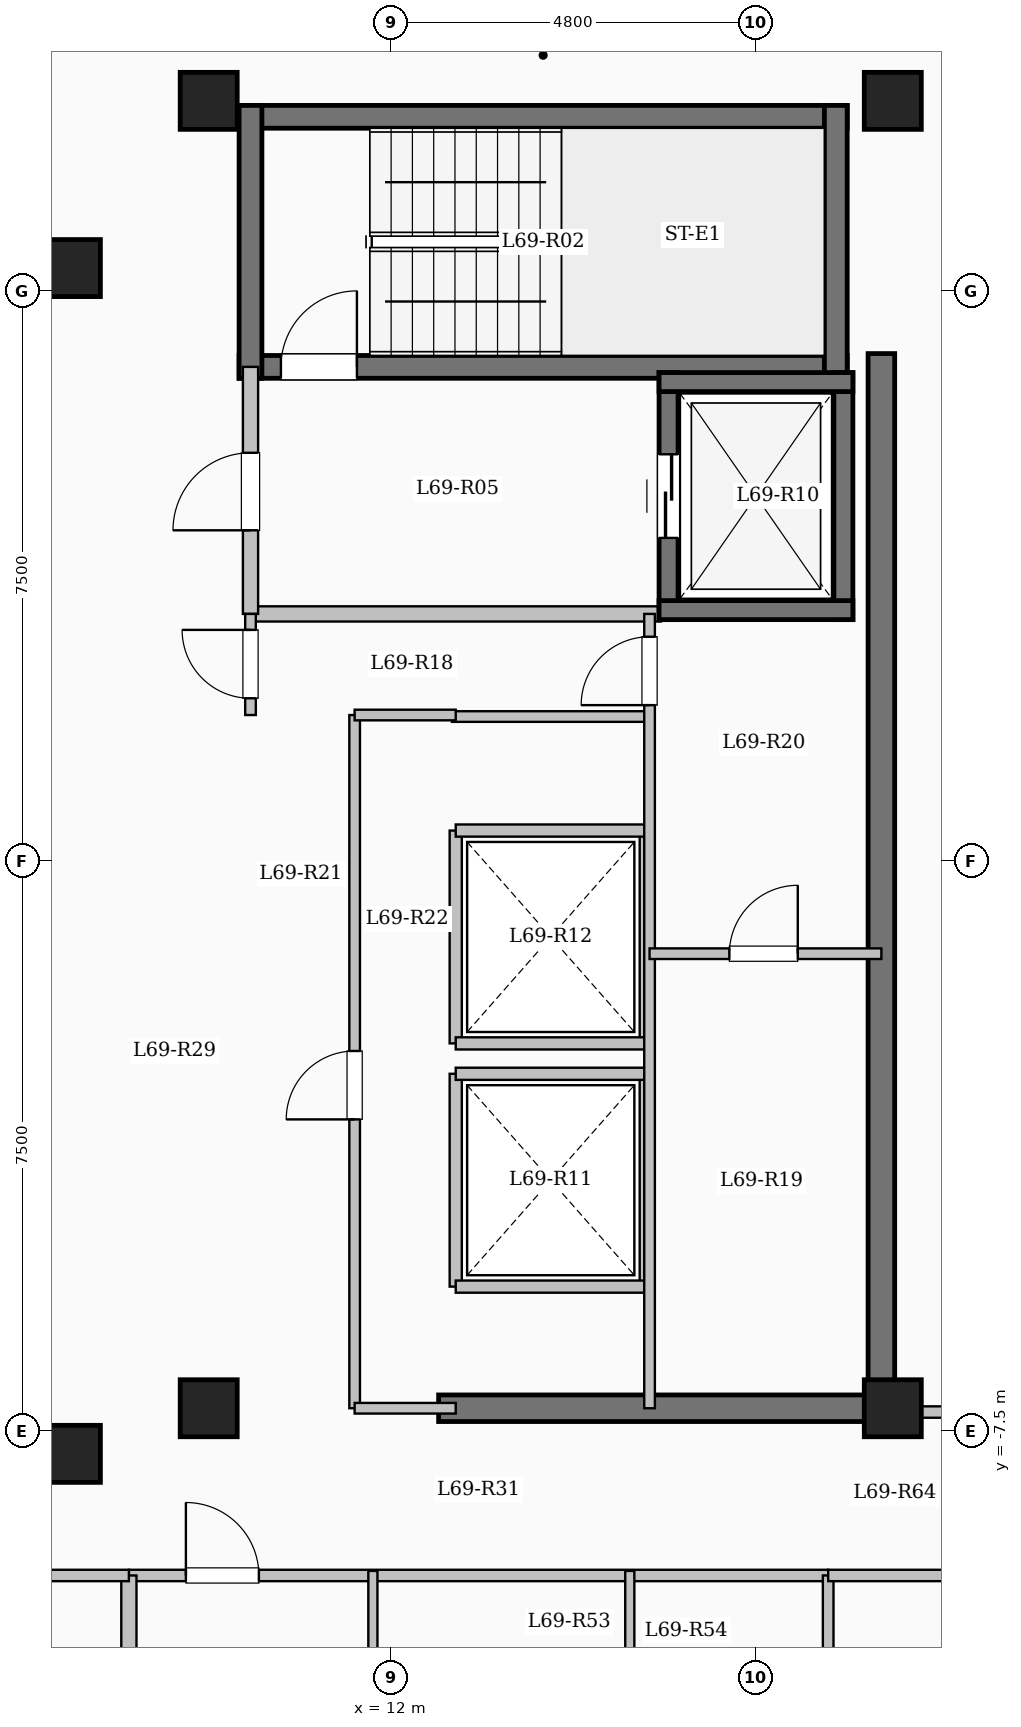
"""IFC4 building model, lengths in metres.
Left out: names, types, materials, properties, quantities, classifications, styles, units other than length and angle.
Written with IfcOpenShell. Run it as: python <this file> out.ifc"""

import sys

from ifc_helpers import new_model, si_unit, direction, frame, frame_2d, origin, origin_2d, place, context, subcontext, project, spatial, rectangle, extrude, element, fill, save


model = new_model("IFC4")
c1 = context("Model", 3, precision=1e-05, world=origin(), true_north=direction((0.0, 1.0)))
c2 = subcontext(c1, "Body", "Model", "MODEL_VIEW")
j1 = project(units=[si_unit("LENGTHUNIT", "METRE"), si_unit("PLANEANGLEUNIT", "RADIAN")], contexts=[c1])
p1 = place(None, origin())
s1 = spatial("IfcSite", under=j1, at=p1, CompositionType="ELEMENT")
p2 = place(p1, origin())
s2 = spatial("IfcBuilding", under=s1, at=p2, CompositionType="ELEMENT")
p3 = place(p2, frame((0.0, 0.0, 254.9)))
s3 = spatial("IfcBuildingStorey", under=s2, at=p3, CompositionType="ELEMENT", Elevation=254.9)
for number, where, z_axis, x_axis in (
    (1, (7.8, -7.8, 0.0), (0.0, 0.0, 1.0), (1.0, 0.0, 0.0)),
    (2, (7.8, 7.8, 0.0), (0.0, 0.0, 1.0), (1.0, 0.0, 0.0)),
    (3, (9.6, -7.2, 0.0), (0.0, 0.0, 1.0), (1.0, 0.0, 0.0)),
    (4, (9.6, 10.0, 0.0), (0.0, 0.0, 1.0), (1.0, 0.0, 0.0)),
    (5, (18.6, -7.2, 0.0), (0.0, 0.0, 1.0), (1.0, 0.0, 0.0)),
    (6, (18.6, 10.0, 0.0), (0.0, 0.0, 1.0), (1.0, 0.0, 0.0)),
):
    element("IfcColumn", number, at=place(p3, frame(where, z_axis=z_axis, x_axis=x_axis)), inside=s3, PredefinedType="COLUMN", context=c2, shape_type="SweptSolid", body=[
        extrude(rectangle(XDim=0.75, YDim=0.75, at=origin_2d()), origin(), (0.0, 0.0, 1.0), 3.35),
    ])
p4 = place(p3, frame((10.0, 9.79, 0.0), z_axis=(0.0, 0.0, 1.0), x_axis=(1.0, 0.0, 0.0)))
e7 = element("IfcWall", 7, at=p4, inside=s3, PredefinedType="SHEAR", context=c2, shape_type="SweptSolid", body=[
    extrude(rectangle(XDim=8.0, YDim=0.3, at=frame_2d((4.0, 0.0))), origin(), (0.0, 0.0, 1.0), 3.35),
])
p5 = place(p3, frame((10.0, 6.5, 0.0), z_axis=(0.0, 0.0, 1.0), x_axis=(1.0, 0.0, 0.0)))
e8 = element("IfcWall", 8, at=p5, inside=s3, PredefinedType="SHEAR", context=c2, shape_type="SweptSolid", body=[
    extrude(rectangle(XDim=8.0, YDim=0.3, at=frame_2d((4.0, 0.0))), origin(), (0.0, 0.0, 1.0), 3.35),
])
p6 = place(p5, frame((0.55, 0.0, 0.0)))
e9 = element("IfcOpeningElement", 9, at=p6, cuts=e8, PredefinedType="OPENING", context=c2, shape_type="SweptSolid", body=[
    extrude(rectangle(XDim=1.0, YDim=2.15, at=frame_2d((0.5, 1.075))), frame((0.0, 0.16, 0.0), z_axis=(0.0, -1.0, 0.0), x_axis=(1.0, 0.0, 0.0)), (0.0, 0.0, 1.0), 0.32),
])
for number, where, z_axis, x_axis in (
    (10, (10.15, 6.35, 0.0), (0.0, 0.0, 1.0), (0.0, 1.0, 0.0)),
    (11, (17.85, 6.35, 0.0), (0.0, 0.0, 1.0), (0.0, 1.0, 0.0)),
):
    element("IfcWall", number, at=place(p3, frame(where, z_axis=z_axis, x_axis=x_axis)), inside=s3, PredefinedType="SHEAR", context=c2, shape_type="SweptSolid", body=[
        extrude(rectangle(XDim=3.59, YDim=0.3, at=frame_2d((1.795, 0.0))), origin(), (0.0, 0.0, 1.0), 3.35),
    ])
p7 = place(p3, frame((10.15, 3.25, 0.0), z_axis=(0.0, 0.0, 1.0), x_axis=(1.0, 0.0, 0.0)))
e12 = element("IfcWall", 12, at=p7, inside=s3, PredefinedType="SOLIDWALL", context=c2, shape_type="SweptSolid", body=[
    extrude(rectangle(XDim=5.4, YDim=0.2, at=frame_2d((2.7, 0.0))), origin(), (0.0, 0.0, 1.0), 3.1),
])
p8 = place(p3, frame((10.15, 3.25, 0.0), z_axis=(0.0, 0.0, 1.0), x_axis=(0.0, 1.0, 0.0)))
e13 = element("IfcWall", 13, at=p8, inside=s3, PredefinedType="SOLIDWALL", context=c2, shape_type="SweptSolid", body=[
    extrude(rectangle(XDim=3.25, YDim=0.2, at=frame_2d((1.625, 0.0))), origin(), (0.0, 0.0, 1.0), 3.1),
])
p9 = place(p8, frame((1.1, 0.0, 0.0)))
e14 = element("IfcOpeningElement", 14, at=p9, cuts=e13, PredefinedType="OPENING", context=c2, shape_type="SweptSolid", body=[
    extrude(rectangle(XDim=1.02, YDim=2.15, at=frame_2d((0.51, 1.075))), frame((0.0, 0.11, 0.0), z_axis=(0.0, -1.0, 0.0), x_axis=(1.0, 0.0, 0.0)), (0.0, 0.0, 1.0), 0.22),
])
p10 = place(p3, frame((15.65, 3.175, 0.0), z_axis=(0.0, 0.0, 1.0), x_axis=(0.0, 1.0, 0.0)))
e15 = element("IfcWall", 15, at=p10, inside=s3, PredefinedType="SHEAR", context=c2, shape_type="SweptSolid", body=[
    extrude(rectangle(XDim=3.25, YDim=0.25, at=frame_2d((1.625, 0.0))), origin(), (0.0, 0.0, 1.0), 3.35),
])
p11 = place(p10, frame((1.075, 0.0, 0.0)))
e16 = element("IfcOpeningElement", 16, at=p11, cuts=e15, PredefinedType="OPENING", context=c2, shape_type="SweptSolid", body=[
    extrude(rectangle(XDim=1.1, YDim=2.15, at=frame_2d((0.55, 1.075))), frame((0.0, 0.135, 0.0), z_axis=(0.0, -1.0, 0.0), x_axis=(1.0, 0.0, 0.0)), (0.0, 0.0, 1.0), 0.27),
])
p12 = place(p3, frame((17.95, 3.175, 0.0), z_axis=(0.0, 0.0, 1.0), x_axis=(0.0, 1.0, 0.0)))
e17 = element("IfcWall", 17, at=p12, inside=s3, PredefinedType="SHEAR", context=c2, shape_type="SweptSolid", body=[
    extrude(rectangle(XDim=3.25, YDim=0.25, at=frame_2d((1.625, 0.0))), origin(), (0.0, 0.0, 1.0), 3.35),
])
for number, where, z_axis, x_axis in (
    (18, (15.525, 3.3, 0.0), (0.0, 0.0, 1.0), (1.0, 0.0, 0.0)),
    (19, (15.525, 6.3, 0.0), (0.0, 0.0, 1.0), (1.0, 0.0, 0.0)),
):
    element("IfcWall", number, at=place(p3, frame(where, z_axis=z_axis, x_axis=x_axis)), inside=s3, PredefinedType="SHEAR", context=c2, shape_type="SweptSolid", body=[
        extrude(rectangle(XDim=2.55, YDim=0.25, at=frame_2d((1.275, 0.0))), origin(), (0.0, 0.0, 1.0), 3.35),
    ])
for number, where, z_axis, x_axis in (
    (20, (12.85, -5.6, 0.0), (0.0, 0.0, 1.0), (0.0, 1.0, 0.0)),
    (21, (15.35, -5.6, 0.0), (0.0, 0.0, 1.0), (0.0, 1.0, 0.0)),
):
    element("IfcWall", number, at=place(p3, frame(where, z_axis=z_axis, x_axis=x_axis)), inside=s3, PredefinedType="SOLIDWALL", context=c2, shape_type="SweptSolid", body=[
        extrude(rectangle(XDim=2.8, YDim=0.16, at=frame_2d((1.4, 0.0))), origin(), (0.0, 0.0, 1.0), 3.1),
    ])
for number, where, z_axis, x_axis in (
    (22, (12.85, -5.6, 0.0), (0.0, 0.0, 1.0), (1.0, 0.0, 0.0)),
    (23, (12.85, -2.8, 0.0), (0.0, 0.0, 1.0), (1.0, 0.0, 0.0)),
):
    element("IfcWall", number, at=place(p3, frame(where, z_axis=z_axis, x_axis=x_axis)), inside=s3, PredefinedType="SOLIDWALL", context=c2, shape_type="SweptSolid", body=[
        extrude(rectangle(XDim=2.5, YDim=0.16, at=frame_2d((1.25, 0.0))), origin(), (0.0, 0.0, 1.0), 3.1),
    ])
for number, where, z_axis, x_axis in (
    (24, (12.85, -2.4, 0.0), (0.0, 0.0, 1.0), (0.0, 1.0, 0.0)),
    (25, (15.35, -2.4, 0.0), (0.0, 0.0, 1.0), (0.0, 1.0, 0.0)),
):
    element("IfcWall", number, at=place(p3, frame(where, z_axis=z_axis, x_axis=x_axis)), inside=s3, PredefinedType="SOLIDWALL", context=c2, shape_type="SweptSolid", body=[
        extrude(rectangle(XDim=2.8, YDim=0.16, at=frame_2d((1.4, 0.0))), origin(), (0.0, 0.0, 1.0), 3.1),
    ])
for number, where, z_axis, x_axis in (
    (26, (12.85, -2.4, 0.0), (0.0, 0.0, 1.0), (1.0, 0.0, 0.0)),
    (27, (12.85, 0.4, 0.0), (0.0, 0.0, 1.0), (1.0, 0.0, 0.0)),
):
    element("IfcWall", number, at=place(p3, frame(where, z_axis=z_axis, x_axis=x_axis)), inside=s3, PredefinedType="SOLIDWALL", context=c2, shape_type="SweptSolid", body=[
        extrude(rectangle(XDim=2.5, YDim=0.16, at=frame_2d((1.25, 0.0))), origin(), (0.0, 0.0, 1.0), 3.1),
    ])
p13 = place(p3, frame((18.45, -7.375, 0.0), z_axis=(0.0, 0.0, 1.0), x_axis=(0.0, 1.0, 0.0)))
e28 = element("IfcWall", 28, at=p13, inside=s3, PredefinedType="SHEAR", context=c2, shape_type="SweptSolid", body=[
    extrude(rectangle(XDim=14.05, YDim=0.35, at=frame_2d((7.025, 0.0))), origin(), (0.0, 0.0, 1.0), 3.35),
])
p14 = place(p3, frame((12.625, -7.2, 0.0), z_axis=(0.0, 0.0, 1.0), x_axis=(1.0, 0.0, 0.0)))
e29 = element("IfcWall", 29, at=p14, inside=s3, PredefinedType="SHEAR", context=c2, shape_type="SweptSolid", body=[
    extrude(rectangle(XDim=6.0, YDim=0.35, at=frame_2d((3.0, 0.0))), origin(), (0.0, 0.0, 1.0), 3.35),
])
p15 = place(p3, frame((12.8, 1.9, 0.0), z_axis=(0.0, 0.0, 1.0), x_axis=(1.0, 0.0, 0.0)))
e30 = element("IfcWall", 30, at=p15, inside=s3, PredefinedType="PARTITIONING", context=c2, shape_type="SweptSolid", body=[
    extrude(rectangle(XDim=2.6, YDim=0.14, at=frame_2d((1.3, 0.0))), origin(), (0.0, 0.0, 1.0), 3.1),
])
p16 = place(p3, frame((10.15, 1.92, 0.0), z_axis=(0.0, 0.0, 1.0), x_axis=(0.0, 1.0, 0.0)))
e31 = element("IfcWall", 31, at=p16, inside=s3, PredefinedType="PARTITIONING", context=c2, shape_type="SweptSolid", body=[
    extrude(rectangle(XDim=1.33, YDim=0.14, at=frame_2d((0.665, 0.0))), origin(), (0.0, 0.0, 1.0), 3.1),
])
p17 = place(p16, frame((0.22, 0.0, 0.0)))
e32 = element("IfcOpeningElement", 32, at=p17, cuts=e31, PredefinedType="OPENING", context=c2, shape_type="SweptSolid", body=[
    extrude(rectangle(XDim=0.9, YDim=2.08, at=frame_2d((0.45, 1.04))), frame((0.0, 0.08, 0.0), z_axis=(0.0, -1.0, 0.0), x_axis=(1.0, 0.0, 0.0)), (0.0, 0.0, 1.0), 0.16),
])
p18 = place(p3, frame((15.4, -7.2, 0.0), z_axis=(0.0, 0.0, 1.0), x_axis=(0.0, 1.0, 0.0)))
e33 = element("IfcWall", 33, at=p18, inside=s3, PredefinedType="PARTITIONING", context=c2, shape_type="SweptSolid", body=[
    extrude(rectangle(XDim=10.45, YDim=0.14, at=frame_2d((5.225, 0.0))), origin(), (0.0, 0.0, 1.0), 3.1),
])
p19 = place(p18, frame((9.25, 0.0, 0.0)))
e34 = element("IfcOpeningElement", 34, at=p19, cuts=e33, PredefinedType="OPENING", context=c2, shape_type="SweptSolid", body=[
    extrude(rectangle(XDim=0.9, YDim=2.08, at=frame_2d((0.45, 1.04))), frame((0.0, 0.08, 0.0), z_axis=(0.0, -1.0, 0.0), x_axis=(1.0, 0.0, 0.0)), (0.0, 0.0, 1.0), 0.16),
])
p20 = place(p3, frame((15.4, -1.22, 0.0), z_axis=(0.0, 0.0, 1.0), x_axis=(1.0, 0.0, 0.0)))
e35 = element("IfcWall", 35, at=p20, inside=s3, PredefinedType="PARTITIONING", context=c2, shape_type="SweptSolid", body=[
    extrude(rectangle(XDim=3.05, YDim=0.14, at=frame_2d((1.525, 0.0))), origin(), (0.0, 0.0, 1.0), 3.1),
])
p21 = place(p20, frame((1.05, 0.0, 0.0)))
e36 = element("IfcOpeningElement", 36, at=p21, cuts=e35, PredefinedType="OPENING", context=c2, shape_type="SweptSolid", body=[
    extrude(rectangle(XDim=0.9, YDim=2.08, at=frame_2d((0.45, 1.04))), frame((0.0, 0.08, 0.0), z_axis=(0.0, -1.0, 0.0), x_axis=(1.0, 0.0, 0.0)), (0.0, 0.0, 1.0), 0.16),
])
p22 = place(p3, frame((11.52, -7.2, 0.0), z_axis=(0.0, 0.0, 1.0), x_axis=(0.0, 1.0, 0.0)))
e37 = element("IfcWall", 37, at=p22, inside=s3, PredefinedType="PARTITIONING", context=c2, shape_type="SweptSolid", body=[
    extrude(rectangle(XDim=9.12, YDim=0.14, at=frame_2d((4.56, 0.0))), origin(), (0.0, 0.0, 1.0), 3.1),
])
p23 = place(p22, frame((3.8, 0.0, 0.0)))
e38 = element("IfcOpeningElement", 38, at=p23, cuts=e37, PredefinedType="OPENING", context=c2, shape_type="SweptSolid", body=[
    extrude(rectangle(XDim=0.9, YDim=2.08, at=frame_2d((0.45, 1.04))), frame((0.0, 0.08, 0.0), z_axis=(0.0, -1.0, 0.0), x_axis=(1.0, 0.0, 0.0)), (0.0, 0.0, 1.0), 0.16),
])
p24 = place(p3, frame((11.52, 1.92, 0.0), z_axis=(0.0, 0.0, 1.0), x_axis=(1.0, 0.0, 0.0)))
e39 = element("IfcWall", 39, at=p24, inside=s3, PredefinedType="PARTITIONING", context=c2, shape_type="SweptSolid", body=[
    extrude(rectangle(XDim=1.33, YDim=0.14, at=frame_2d((0.665, 0.0))), origin(), (0.0, 0.0, 1.0), 3.1),
])
p25 = place(p3, frame((11.52, -7.2, 0.0), z_axis=(0.0, 0.0, 1.0), x_axis=(1.0, 0.0, 0.0)))
e40 = element("IfcWall", 40, at=p25, inside=s3, PredefinedType="PARTITIONING", context=c2, shape_type="SweptSolid", body=[
    extrude(rectangle(XDim=1.33, YDim=0.14, at=frame_2d((0.665, 0.0))), origin(), (0.0, 0.0, 1.0), 2.235),
])
p26 = place(p3, frame((8.55, -9.4, 0.0), z_axis=(0.0, 0.0, 1.0), x_axis=(1.0, 0.0, 0.0)))
e41 = element("IfcWall", 41, at=p26, inside=s3, PredefinedType="PARTITIONING", context=c2, shape_type="SweptSolid", body=[
    extrude(rectangle(XDim=9.2, YDim=0.15, at=frame_2d((4.6, 0.0))), origin(), (0.0, 0.0, 1.0), 3.1),
])
p27 = place(p26, frame((0.75, 0.0, 0.0)))
e42 = element("IfcOpeningElement", 42, at=p27, cuts=e41, PredefinedType="OPENING", context=c2, shape_type="SweptSolid", body=[
    extrude(rectangle(XDim=0.96, YDim=2.15, at=frame_2d((0.48, 1.075))), frame((0.0, 0.085, 0.0), z_axis=(0.0, -1.0, 0.0), x_axis=(1.0, 0.0, 0.0)), (0.0, 0.0, 1.0), 0.17),
])
p28 = place(p3, frame((11.76, -20.9, 0.0), z_axis=(0.0, 0.0, 1.0), x_axis=(0.0, 1.0, 0.0)))
e43 = element("IfcWall", 43, at=p28, inside=s3, PredefinedType="PARTITIONING", context=c2, shape_type="SweptSolid", body=[
    extrude(rectangle(XDim=11.56, YDim=0.12, at=frame_2d((5.78, 0.0))), origin(), (0.0, 0.0, 1.0), 3.1),
])
p29 = place(p28, frame((7.565, 0.0, 0.0)))
e44 = element("IfcOpeningElement", 44, at=p29, cuts=e43, PredefinedType="OPENING", context=c2, shape_type="SweptSolid", body=[
    extrude(rectangle(XDim=1.08, YDim=2.15, at=frame_2d((0.54, 1.075))), frame((0.0, 0.07, 0.0), z_axis=(0.0, -1.0, 0.0), x_axis=(1.0, 0.0, 0.0)), (0.0, 0.0, 1.0), 0.14),
])
p30 = place(p3, frame((15.14, -11.97, 0.0), z_axis=(0.0, 0.0, 1.0), x_axis=(0.0, 1.0, 0.0)))
e45 = element("IfcWall", 45, at=p30, inside=s3, PredefinedType="PARTITIONING", context=c2, shape_type="SweptSolid", body=[
    extrude(rectangle(XDim=2.63, YDim=0.12, at=frame_2d((1.315, 0.0))), origin(), (0.0, 0.0, 1.0), 2.685),
])
p31 = place(p3, frame((8.55, -21.504, 0.0), z_axis=(0.0, 0.0, 1.0), x_axis=(0.0, 1.0, 0.0)))
e46 = element("IfcWall", 46, at=p31, inside=s3, PredefinedType="SOLIDWALL", context=c2, shape_type="SweptSolid", body=[
    extrude(rectangle(XDim=12.104, YDim=0.2, at=frame_2d((6.052, 0.0))), origin(), (0.0, 0.0, 1.0), 3.1),
])
p32 = place(p3, frame((-8.55, -9.4, 0.0), z_axis=(0.0, 0.0, 1.0), x_axis=(1.0, 0.0, 0.0)))
e47 = element("IfcWall", 47, at=p32, inside=s3, PredefinedType="PARTITIONING", context=c2, shape_type="SweptSolid", body=[
    extrude(rectangle(XDim=17.1, YDim=0.15, at=frame_2d((8.55, 0.0))), origin(), (0.0, 0.0, 1.0), 3.1),
])
p33 = place(p32, frame((1.75, 0.0, 0.0)))
e48 = element("IfcOpeningElement", 48, at=p33, cuts=e47, PredefinedType="OPENING", context=c2, shape_type="SweptSolid", body=[
    extrude(rectangle(XDim=0.95, YDim=2.15, at=frame_2d((0.475, 1.075))), frame((0.0, 0.085, 0.0), z_axis=(0.0, -1.0, 0.0), x_axis=(1.0, 0.0, 0.0)), (0.0, 0.0, 1.0), 0.17),
])
p34 = place(p32, frame((10.5, 0.0, 0.0)))
e49 = element("IfcOpeningElement", 49, at=p34, cuts=e47, PredefinedType="OPENING", context=c2, shape_type="SweptSolid", body=[
    extrude(rectangle(XDim=0.95, YDim=2.15, at=frame_2d((0.475, 1.075))), frame((0.0, 0.085, 0.0), z_axis=(0.0, -1.0, 0.0), x_axis=(1.0, 0.0, 0.0)), (0.0, 0.0, 1.0), 0.17),
])
p35 = place(p3, frame((18.45, -7.25, 0.0), z_axis=(0.0, 0.0, 1.0), x_axis=(1.0, 0.0, 0.0)))
e50 = element("IfcWall", 50, at=p35, inside=s3, PredefinedType="PARTITIONING", context=c2, shape_type="SweptSolid", body=[
    extrude(rectangle(XDim=4.23, YDim=0.15, at=frame_2d((2.115, 0.0))), origin(), (0.0, 0.0, 1.0), 3.1),
])
p36 = place(p35, frame((1.5, 0.0, 0.0)))
e51 = element("IfcOpeningElement", 51, at=p36, cuts=e50, PredefinedType="OPENING", context=c2, shape_type="SweptSolid", body=[
    extrude(rectangle(XDim=1.08, YDim=2.15, at=frame_2d((0.54, 1.075))), frame((0.0, 0.085, 0.0), z_axis=(0.0, -1.0, 0.0), x_axis=(1.0, 0.0, 0.0)), (0.0, 0.0, 1.0), 0.17),
])
p37 = place(p3, frame((17.75, -17.55, 0.0), z_axis=(0.0, 0.0, 1.0), x_axis=(0.0, 1.0, 0.0)))
e52 = element("IfcWall", 52, at=p37, inside=s3, PredefinedType="PARTITIONING", context=c2, shape_type="SweptSolid", body=[
    extrude(rectangle(XDim=8.15, YDim=0.14, at=frame_2d((4.075, 0.0))), origin(), (0.0, 0.0, 1.0), 3.1),
])
p38 = place(p3, frame((17.75, -9.4, 0.0), z_axis=(0.0, 0.0, 1.0), x_axis=(1.0, 0.0, 0.0)))
e53 = element("IfcWall", 53, at=p38, inside=s3, PredefinedType="PARTITIONING", context=c2, shape_type="SweptSolid", body=[
    extrude(rectangle(XDim=4.93, YDim=0.15, at=frame_2d((2.465, 0.0))), origin(), (0.0, 0.0, 1.0), 3.1),
])
p39 = place(p38, frame((1.99, 0.0, 0.0)))
e54 = element("IfcOpeningElement", 54, at=p39, cuts=e53, PredefinedType="OPENING", context=c2, shape_type="SweptSolid", body=[
    extrude(rectangle(XDim=0.95, YDim=2.15, at=frame_2d((0.475, 1.075))), frame((0.0, 0.085, 0.0), z_axis=(0.0, -1.0, 0.0), x_axis=(1.0, 0.0, 0.0)), (0.0, 0.0, 1.0), 0.17),
])
p40 = place(p6, origin())
e55 = element("IfcDoor", 55, at=p40, inside=s3, OperationType="SINGLE_SWING_RIGHT", PredefinedType="DOOR", context=c2, shape_type="SweptSolid", body=[
    extrude(rectangle(XDim=1.0, YDim=2.15, at=frame_2d((0.5, 1.075))), frame((0.0, 0.025, 0.0), z_axis=(0.0, -1.0, 0.0), x_axis=(1.0, 0.0, 0.0)), (0.0, 0.0, 1.0), 0.05),
])
fill(e9, e55)
p41 = place(p9, origin())
e56 = element("IfcDoor", 56, at=p41, inside=s3, OperationType="SINGLE_SWING_LEFT", PredefinedType="DOOR", context=c2, shape_type="SweptSolid", body=[
    extrude(rectangle(XDim=1.02, YDim=2.15, at=frame_2d((0.51, 1.075))), frame((0.0, 0.025, 0.0), z_axis=(0.0, -1.0, 0.0), x_axis=(1.0, 0.0, 0.0)), (0.0, 0.0, 1.0), 0.05),
])
fill(e14, e56)
p42 = place(p11, origin())
e57 = element("IfcDoor", 57, at=p42, inside=s3, OperationType="SLIDING_TO_LEFT", PredefinedType="DOOR", context=c2, shape_type="SweptSolid", body=[
    extrude(rectangle(XDim=1.1, YDim=2.15, at=frame_2d((0.55, 1.075))), frame((0.0, 0.025, 0.0), z_axis=(0.0, -1.0, 0.0), x_axis=(1.0, 0.0, 0.0)), (0.0, 0.0, 1.0), 0.05),
])
fill(e16, e57)
p43 = place(p17, origin())
e58 = element("IfcDoor", 58, at=p43, inside=s3, OperationType="SINGLE_SWING_RIGHT", PredefinedType="DOOR", context=c2, shape_type="SweptSolid", body=[
    extrude(rectangle(XDim=0.9, YDim=2.08, at=frame_2d((0.45, 1.04))), frame((0.0, 0.025, 0.0), z_axis=(0.0, -1.0, 0.0), x_axis=(1.0, 0.0, 0.0)), (0.0, 0.0, 1.0), 0.05),
])
fill(e32, e58)
p44 = place(p19, origin())
e59 = element("IfcDoor", 59, at=p44, inside=s3, OperationType="SINGLE_SWING_LEFT", PredefinedType="DOOR", context=c2, shape_type="SweptSolid", body=[
    extrude(rectangle(XDim=0.9, YDim=2.08, at=frame_2d((0.45, 1.04))), frame((0.0, 0.025, 0.0), z_axis=(0.0, -1.0, 0.0), x_axis=(1.0, 0.0, 0.0)), (0.0, 0.0, 1.0), 0.05),
])
fill(e34, e59)
p45 = place(p21, origin())
e60 = element("IfcDoor", 60, at=p45, inside=s3, OperationType="SINGLE_SWING_RIGHT", PredefinedType="DOOR", context=c2, shape_type="SweptSolid", body=[
    extrude(rectangle(XDim=0.9, YDim=2.08, at=frame_2d((0.45, 1.04))), frame((0.0, 0.025, 0.0), z_axis=(0.0, -1.0, 0.0), x_axis=(1.0, 0.0, 0.0)), (0.0, 0.0, 1.0), 0.05),
])
fill(e36, e60)
p46 = place(p23, origin())
e61 = element("IfcDoor", 61, at=p46, inside=s3, OperationType="SINGLE_SWING_LEFT", PredefinedType="DOOR", context=c2, shape_type="SweptSolid", body=[
    extrude(rectangle(XDim=0.9, YDim=2.08, at=frame_2d((0.45, 1.04))), frame((0.0, 0.025, 0.0), z_axis=(0.0, -1.0, 0.0), x_axis=(1.0, 0.0, 0.0)), (0.0, 0.0, 1.0), 0.05),
])
fill(e38, e61)
p47 = place(p27, origin())
e62 = element("IfcDoor", 62, at=p47, inside=s3, OperationType="SINGLE_SWING_LEFT", PredefinedType="DOOR", context=c2, shape_type="SweptSolid", body=[
    extrude(rectangle(XDim=0.96, YDim=2.15, at=frame_2d((0.48, 1.075))), frame((0.0, 0.025, 0.0), z_axis=(0.0, -1.0, 0.0), x_axis=(1.0, 0.0, 0.0)), (0.0, 0.0, 1.0), 0.05),
])
fill(e42, e62)
save(model, sys.argv[1])
